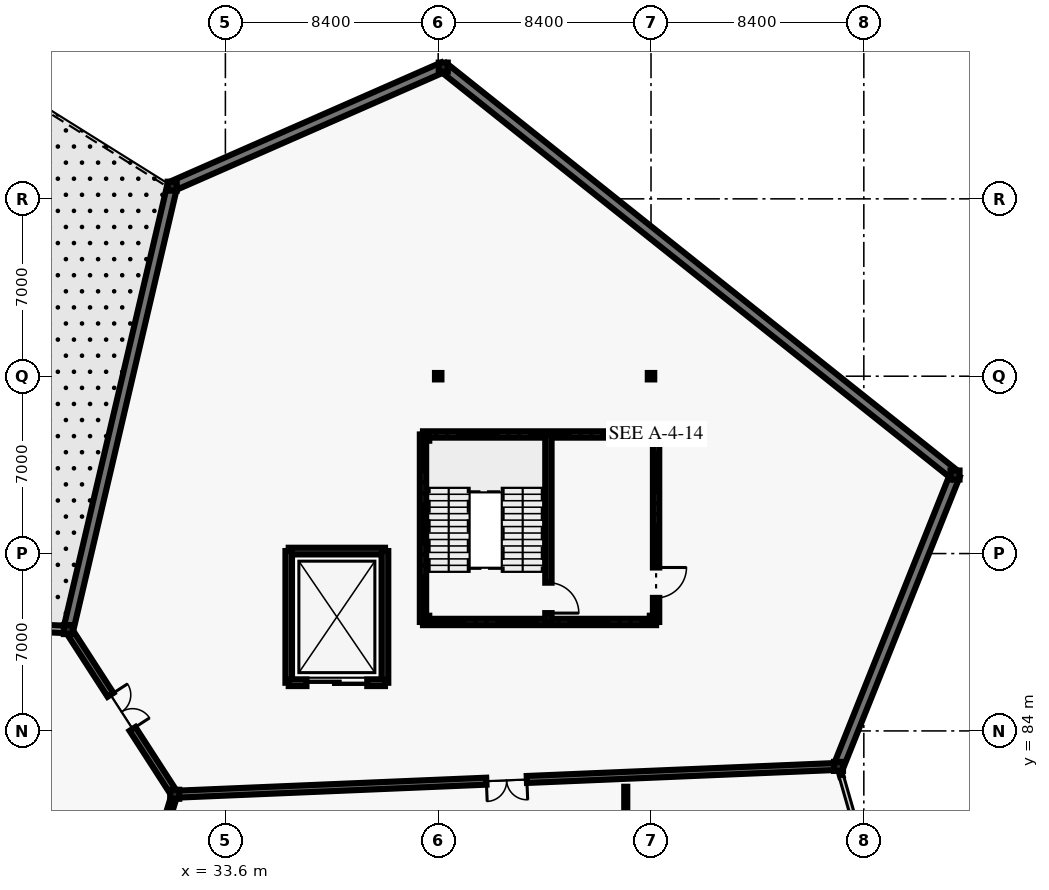
"""IFC4 building model, lengths in metres.
Left out: names, types, materials, properties, quantities, classifications, styles, units other than length and angle.
Written with IfcOpenShell. Run it as: python <this file> out.ifc"""

import sys

from ifc_helpers import new_model, si_unit, direction, frame, frame_2d, origin, origin_2d, place, context, subcontext, project, spatial, rectangle, hollow_circle, i_section, extrude, element, fill, save


model = new_model("IFC4")
c1 = context("Model", 3, precision=1e-05, world=origin(), true_north=direction((0.0, 1.0)))
c2 = subcontext(c1, "Body", "Model", "MODEL_VIEW")
j1 = project(units=[si_unit("LENGTHUNIT", "METRE"), si_unit("PLANEANGLEUNIT", "RADIAN")], contexts=[c1])
p1 = place(None, origin())
s1 = spatial("IfcSite", under=j1, at=p1, CompositionType="ELEMENT")
p2 = place(p1, origin())
s2 = spatial("IfcBuilding", under=s1, at=p2, CompositionType="ELEMENT")
p3 = place(p2, frame((0.0, 0.0, 10.2)))
s3 = spatial("IfcBuildingStorey", under=s2, at=p3, CompositionType="ELEMENT", Elevation=10.2)
for number, where, z_axis, x_axis in (
    (1, (27.4, 88.0, 0.0), (0.0, 0.0, 1.0), (1.0, 0.0, 0.0)),
    (2, (31.5, 105.5, 0.0), (0.0, 0.0, 1.0), (1.0, 0.0, 0.0)),
    (3, (31.6, 81.5, 0.0), (0.0, 0.0, 1.0), (1.0, 0.0, 0.0)),
    (4, (42.2, 110.2, 0.0), (0.0, 0.0, 1.0), (1.0, 0.0, 0.0)),
    (5, (57.8, 82.6, 0.0), (0.0, 0.0, 1.0), (1.0, 0.0, 0.0)),
    (6, (62.4, 94.1, 0.0), (0.0, 0.0, 1.0), (1.0, 0.0, 0.0)),
):
    element("IfcColumn", number, at=place(p3, frame(where, z_axis=z_axis, x_axis=x_axis)), inside=s3, PredefinedType="COLUMN", context=c2, shape_type="SweptSolid", body=[
        extrude(hollow_circle(Radius=0.178, WallThickness=0.013, at=origin_2d()), origin(), (0.0, 0.0, 1.0), 4.8),
    ])
for number, where, z_axis, x_axis in (
    (7, (42.0, 98.0, 0.0), (0.0, 0.0, 1.0), (1.0, 0.0, 0.0)),
    (8, (50.4, 98.0, 0.0), (0.0, 0.0, 1.0), (1.0, 0.0, 0.0)),
    (9, (41.52, 88.42, 0.0), (0.0, 0.0, 1.0), (1.0, 0.0, 0.0)),
    (10, (50.48, 88.42, 0.0), (0.0, 0.0, 1.0), (1.0, 0.0, 0.0)),
    (11, (50.48, 95.58, 0.0), (0.0, 0.0, 1.0), (1.0, 0.0, 0.0)),
    (12, (41.52, 95.58, 0.0), (0.0, 0.0, 1.0), (1.0, 0.0, 0.0)),
):
    element("IfcColumn", number, at=place(p3, frame(where, z_axis=z_axis, x_axis=x_axis)), inside=s3, PredefinedType="COLUMN", context=c2, shape_type="SweptSolid", body=[
        extrude(i_section(OverallWidth=0.254, OverallDepth=0.254, WebThickness=0.009, FlangeThickness=0.014, FilletRadius=0.013, at=origin_2d()), origin(), (0.0, 0.0, 1.0), 4.8),
    ])
p4 = place(p3, frame((57.829, 82.502, 0.0), z_axis=(0.0, 0.0, 1.0), x_axis=(0.275977786159, -0.961164013864, 0.0)))
e13 = element("IfcWall", 13, at=p4, inside=s3, PredefinedType="SOLIDWALL", context=c2, shape_type="SweptSolid", body=[
    extrude(rectangle(XDim=0.308, YDim=0.095, at=frame_2d((0.154, 0.0))), origin(), (0.0, 0.0, 1.0), 3.62),
])
p5 = place(p3, frame((62.4, 94.1, 0.0), z_axis=(0.0, 0.0, 1.0), x_axis=(-0.371407751599, -0.928469860605, 0.0)))
e14 = element("IfcWall", 14, at=p5, inside=s3, PredefinedType="SOLIDWALL", context=c2, shape_type="SweptSolid", body=[
    extrude(rectangle(XDim=12.326, YDim=0.4, at=frame_2d((6.163, 0.0))), origin(), (0.0, 0.0, 1.0), 3.62),
])
p6 = place(p3, frame((42.2, 110.2, 0.0), z_axis=(0.0, 0.0, 1.0), x_axis=(0.78200261515, -0.623275147827, 0.0)))
e15 = element("IfcWall", 15, at=p6, inside=s3, PredefinedType="SOLIDWALL", context=c2, shape_type="SweptSolid", body=[
    extrude(rectangle(XDim=25.831, YDim=0.4, at=frame_2d((12.916, 0.0))), origin(), (0.0, 0.0, 1.0), 3.62),
])
p7 = place(p3, frame((31.5, 105.5, 0.0), z_axis=(0.0, 0.0, 1.0), x_axis=(0.915568057854, 0.40216306573, 0.0)))
e16 = element("IfcWall", 16, at=p7, inside=s3, PredefinedType="SOLIDWALL", context=c2, shape_type="SweptSolid", body=[
    extrude(rectangle(XDim=11.687, YDim=0.4, at=frame_2d((5.843, 0.0))), origin(), (0.0, 0.0, 1.0), 3.62),
])
p8 = place(p3, frame((27.414, 88.058, 0.0), z_axis=(0.0, 0.0, 1.0), x_axis=(0.228085145328, 0.973641189803, 0.0)))
e17 = element("IfcWall", 17, at=p8, inside=s3, PredefinedType="SOLIDWALL", context=c2, shape_type="SweptSolid", body=[
    extrude(rectangle(XDim=17.914, YDim=0.4, at=frame_2d((8.957, 0.0))), origin(), (0.0, 0.0, 1.0), 3.62),
])
p9 = place(p3, frame((5.7, 89.0, 0.0), z_axis=(0.0, 0.0, 1.0), x_axis=(0.998940232076, -0.046026217963, 0.0)))
e18 = element("IfcWall", 18, at=p9, inside=s3, PredefinedType="SOLIDWALL", context=c2, shape_type="SweptSolid", body=[
    extrude(rectangle(XDim=21.663, YDim=0.29, at=frame_2d((10.832, 0.0))), origin(), (0.0, 0.0, 1.0), 3.62),
])
p10 = place(p9, frame((9.856, 0.0, 0.0)))
e19 = element("IfcOpeningElement", 19, at=p10, cuts=e18, PredefinedType="OPENING", context=c2, shape_type="SweptSolid", body=[
    extrude(rectangle(XDim=1.95, YDim=2.3, at=frame_2d((0.975, 1.15))), frame((0.0, 0.155, 0.0), z_axis=(0.0, -1.0, 0.0), x_axis=(1.0, 0.0, 0.0)), (0.0, 0.0, 1.0), 0.31),
])
p11 = place(p3, frame((57.8, 82.6, 0.0), z_axis=(0.0, 0.0, 1.0), x_axis=(-0.999119645224, -0.041951573605, 0.0)))
e20 = element("IfcWall", 20, at=p11, inside=s3, PredefinedType="SOLIDWALL", context=c2, shape_type="SweptSolid", body=[
    extrude(rectangle(XDim=26.223, YDim=0.275, at=frame_2d((13.112, 0.0))), origin(), (0.0, 0.0, 1.0), 4.02),
])
p12 = place(p11, frame((12.312, 0.0, 0.0)))
e21 = element("IfcOpeningElement", 21, at=p12, cuts=e20, PredefinedType="OPENING", context=c2, shape_type="SweptSolid", body=[
    extrude(rectangle(XDim=1.6, YDim=2.45, at=frame_2d((0.8, 1.225))), frame((0.0, 0.147, 0.0), z_axis=(0.0, -1.0, 0.0), x_axis=(1.0, 0.0, 0.0)), (0.0, 0.0, 1.0), 0.295),
])
p13 = place(p3, frame((31.6, 81.5, 0.0), z_axis=(0.0, 0.0, 1.0), x_axis=(-0.294479498062, -0.955657797133, 0.0)))
e22 = element("IfcWall", 22, at=p13, inside=s3, PredefinedType="SOLIDWALL", context=c2, shape_type="SweptSolid", body=[
    extrude(rectangle(XDim=17.998, YDim=0.225, at=frame_2d((8.999, 0.0))), origin(), (0.0, 0.0, 1.0), 4.02),
])
p14 = place(p13, frame((7.999, 0.0, 0.0)))
e23 = element("IfcOpeningElement", 23, at=p14, cuts=e22, PredefinedType="OPENING", context=c2, shape_type="SweptSolid", body=[
    extrude(rectangle(XDim=2.0, YDim=2.5, at=frame_2d((1.0, 1.25))), frame((0.0, 0.123, 0.0), z_axis=(0.0, -1.0, 0.0), x_axis=(1.0, 0.0, 0.0)), (0.0, 0.0, 1.0), 0.245),
])
p15 = place(p3, frame((27.4, 88.0, 0.0), z_axis=(0.0, 0.0, 1.0), x_axis=(0.542733189748, -0.839905164138, 0.0)))
e24 = element("IfcWall", 24, at=p15, inside=s3, PredefinedType="SOLIDWALL", context=c2, shape_type="SweptSolid", body=[
    extrude(rectangle(XDim=7.739, YDim=0.275, at=frame_2d((3.87, 0.0))), origin(), (0.0, 0.0, 1.0), 4.02),
])
p16 = place(p15, frame((3.069, 0.0, 0.0)))
e25 = element("IfcOpeningElement", 25, at=p16, cuts=e24, PredefinedType="OPENING", context=c2, shape_type="SweptSolid", body=[
    extrude(rectangle(XDim=1.6, YDim=2.45, at=frame_2d((0.8, 1.225))), frame((0.0, 0.147, 0.0), z_axis=(0.0, -1.0, 0.0), x_axis=(1.0, 0.0, 0.0)), (0.0, 0.0, 1.0), 0.295),
])
p17 = place(p3, frame((49.403, 57.267, 0.0), z_axis=(0.0, 0.0, 1.0), x_axis=(0.0, 1.0, 0.0)))
e26 = element("IfcWall", 26, at=p17, inside=s3, PredefinedType="PARTITIONING", context=c2, shape_type="SweptSolid", body=[
    extrude(rectangle(XDim=24.53, YDim=0.12, at=frame_2d((12.265, 0.0))), origin(), (0.0, 0.0, 1.0), 3.32),
])
p18 = place(p17, frame((11.74, 0.0, 0.0)))
e27 = element("IfcOpeningElement", 27, at=p18, cuts=e26, PredefinedType="OPENING", context=c2, shape_type="SweptSolid", body=[
    extrude(rectangle(XDim=1.05, YDim=2.2, at=frame_2d((0.525, 1.1))), frame((0.0, 0.07, 0.0), z_axis=(0.0, -1.0, 0.0), x_axis=(1.0, 0.0, 0.0)), (0.0, 0.0, 1.0), 0.14),
])
p19 = place(p3, frame((41.4, 88.3, 0.0), z_axis=(0.0, 0.0, 1.0), x_axis=(0.0, 1.0, 0.0)))
e28 = element("IfcWall", 28, at=p19, inside=s3, PredefinedType="SHEAR", context=c2, shape_type="SweptSolid", body=[
    extrude(rectangle(XDim=7.4, YDim=0.25, at=frame_2d((3.7, 0.0))), origin(), (0.0, 0.0, 1.0), 4.56),
])
for number, where, z_axis, x_axis in (
    (29, (41.4, 95.7, 0.0), (0.0, 0.0, 1.0), (1.0, 0.0, 0.0)),
    (30, (50.6, 88.3, 0.0), (0.0, 0.0, 1.0), (-1.0, 0.0, 0.0)),
):
    element("IfcWall", number, at=place(p3, frame(where, z_axis=z_axis, x_axis=x_axis)), inside=s3, PredefinedType="SHEAR", context=c2, shape_type="SweptSolid", body=[
        extrude(rectangle(XDim=9.2, YDim=0.25, at=frame_2d((4.6, 0.0))), origin(), (0.0, 0.0, 1.0), 4.56),
    ])
p20 = place(p3, frame((50.6, 95.7, 0.0), z_axis=(0.0, 0.0, 1.0), x_axis=(0.0, -1.0, 0.0)))
e31 = element("IfcWall", 31, at=p20, inside=s3, PredefinedType="SHEAR", context=c2, shape_type="SweptSolid", body=[
    extrude(rectangle(XDim=7.4, YDim=0.25, at=frame_2d((3.7, 0.0))), origin(), (0.0, 0.0, 1.0), 4.56),
])
p21 = place(p20, frame((5.25, 0.0, 0.0)))
e32 = element("IfcOpeningElement", 32, at=p21, cuts=e31, PredefinedType="OPENING", context=c2, shape_type="SweptSolid", body=[
    extrude(rectangle(XDim=1.2, YDim=2.2, at=frame_2d((0.6, 1.1))), frame((0.0, 0.135, 0.0), z_axis=(0.0, -1.0, 0.0), x_axis=(1.0, 0.0, 0.0)), (0.0, 0.0, 1.0), 0.27),
])
p22 = place(p3, frame((46.35, 95.7, 0.0), z_axis=(0.0, 0.0, 1.0), x_axis=(0.0, -1.0, 0.0)))
e33 = element("IfcWall", 33, at=p22, inside=s3, PredefinedType="SHEAR", context=c2, shape_type="SweptSolid", body=[
    extrude(rectangle(XDim=7.4, YDim=0.25, at=frame_2d((3.7, 0.0))), origin(), (0.0, 0.0, 1.0), 4.56),
])
p23 = place(p22, frame((5.85, 0.0, 0.0)))
e34 = element("IfcOpeningElement", 34, at=p23, cuts=e33, PredefinedType="OPENING", context=c2, shape_type="SweptSolid", body=[
    extrude(rectangle(XDim=1.2, YDim=2.2, at=frame_2d((0.6, 1.1))), frame((0.0, 0.135, 0.0), z_axis=(0.0, -1.0, 0.0), x_axis=(1.0, 0.0, 0.0)), (0.0, 0.0, 1.0), 0.27),
])
p24 = place(p3, frame((36.1, 91.1, 0.0), z_axis=(0.0, 0.0, 1.0), x_axis=(1.0, 0.0, 0.0)))
e35 = element("IfcWall", 35, at=p24, inside=s3, PredefinedType="SHEAR", context=c2, shape_type="SweptSolid", body=[
    extrude(rectangle(XDim=3.8, YDim=0.26, at=frame_2d((1.9, 0.0))), origin(), (0.0, 0.0, 1.0), 4.56),
])
for number, where, z_axis, x_axis in (
    (36, (39.9, 91.1, 0.0), (0.0, 0.0, 1.0), (0.0, -1.0, 0.0)),
    (37, (36.1, 85.9, 0.0), (0.0, 0.0, 1.0), (0.0, 1.0, 0.0)),
):
    element("IfcWall", number, at=place(p3, frame(where, z_axis=z_axis, x_axis=x_axis)), inside=s3, PredefinedType="SHEAR", context=c2, shape_type="SweptSolid", body=[
        extrude(rectangle(XDim=5.2, YDim=0.26, at=frame_2d((2.6, 0.0))), origin(), (0.0, 0.0, 1.0), 4.56),
    ])
p25 = place(p3, frame((39.9, 85.9, 0.0), z_axis=(0.0, 0.0, 1.0), x_axis=(-1.0, 0.0, 0.0)))
e38 = element("IfcWall", 38, at=p25, inside=s3, PredefinedType="SHEAR", context=c2, shape_type="SweptSolid", body=[
    extrude(rectangle(XDim=3.8, YDim=0.26, at=frame_2d((1.9, 0.0))), origin(), (0.0, 0.0, 1.0), 4.56),
])
p26 = place(p25, frame((0.7, 0.0, 0.0)))
e39 = element("IfcOpeningElement", 39, at=p26, cuts=e38, PredefinedType="OPENING", context=c2, shape_type="SweptSolid", body=[
    extrude(rectangle(XDim=2.4, YDim=2.85, at=frame_2d((1.2, 1.425))), frame((0.0, 0.14, 0.0), z_axis=(0.0, -1.0, 0.0), x_axis=(1.0, 0.0, 0.0)), (0.0, 0.0, 1.0), 0.28),
])
p27 = place(p12, origin())
e40 = element("IfcDoor", 40, at=p27, inside=s3, OperationType="DOUBLE_DOOR_SINGLE_SWING", PredefinedType="DOOR", context=c2, shape_type="SweptSolid", body=[
    extrude(rectangle(XDim=1.6, YDim=2.45, at=frame_2d((0.8, 1.225))), frame((0.0, 0.025, 0.0), z_axis=(0.0, -1.0, 0.0), x_axis=(1.0, 0.0, 0.0)), (0.0, 0.0, 1.0), 0.05),
])
fill(e21, e40)
p28 = place(p16, origin())
e41 = element("IfcDoor", 41, at=p28, inside=s3, OperationType="DOUBLE_DOOR_SINGLE_SWING", PredefinedType="DOOR", context=c2, shape_type="SweptSolid", body=[
    extrude(rectangle(XDim=1.6, YDim=2.45, at=frame_2d((0.8, 1.225))), frame((0.0, 0.025, 0.0), z_axis=(0.0, -1.0, 0.0), x_axis=(1.0, 0.0, 0.0)), (0.0, 0.0, 1.0), 0.05),
])
fill(e25, e41)
p29 = place(p21, origin())
e42 = element("IfcDoor", 42, at=p29, inside=s3, OperationType="SINGLE_SWING_LEFT", PredefinedType="DOOR", context=c2, shape_type="SweptSolid", body=[
    extrude(rectangle(XDim=1.2, YDim=2.2, at=frame_2d((0.6, 1.1))), frame((0.0, 0.025, 0.0), z_axis=(0.0, -1.0, 0.0), x_axis=(1.0, 0.0, 0.0)), (0.0, 0.0, 1.0), 0.05),
])
fill(e32, e42)
p30 = place(p23, origin())
e43 = element("IfcDoor", 43, at=p30, inside=s3, OperationType="SINGLE_SWING_RIGHT", PredefinedType="DOOR", context=c2, shape_type="SweptSolid", body=[
    extrude(rectangle(XDim=1.2, YDim=2.2, at=frame_2d((0.6, 1.1))), frame((0.0, 0.025, 0.0), z_axis=(0.0, -1.0, 0.0), x_axis=(1.0, 0.0, 0.0)), (0.0, 0.0, 1.0), 0.05),
])
fill(e34, e43)
p31 = place(p26, origin())
e44 = element("IfcDoor", 44, at=p31, inside=s3, OperationType="SLIDING_TO_LEFT", PredefinedType="DOOR", context=c2, shape_type="SweptSolid", body=[
    extrude(rectangle(XDim=2.4, YDim=2.85, at=frame_2d((1.2, 1.425))), frame((0.0, 0.025, 0.0), z_axis=(0.0, -1.0, 0.0), x_axis=(1.0, 0.0, 0.0)), (0.0, 0.0, 1.0), 0.05),
])
fill(e39, e44)
save(model, sys.argv[1])
